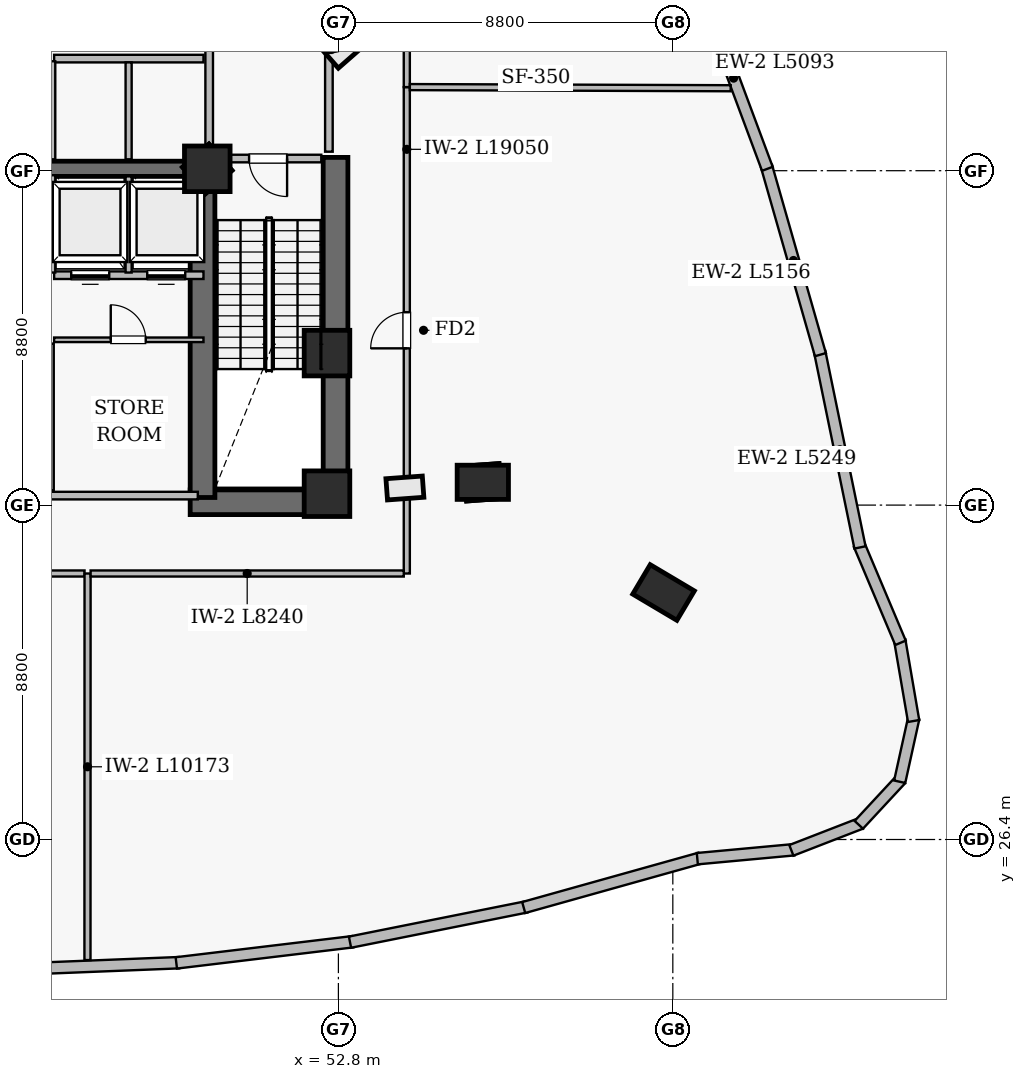
"""IFC4 building model, lengths in metres.
Left out: names, types, materials, properties, quantities, classifications, styles, units other than length and angle.
Written with IfcOpenShell. Run it as: python <this file> out.ifc"""

import sys

from ifc_helpers import new_model, si_unit, direction, frame, frame_2d, origin, origin_2d, place, context, subcontext, project, spatial, rectangle, extrude, element, fill, save


model = new_model("IFC4")
c1 = context("Model", 3, precision=1e-05, world=origin(), true_north=direction((0.0, 1.0)))
c2 = subcontext(c1, "Body", "Model", "MODEL_VIEW")
j1 = project(units=[si_unit("LENGTHUNIT", "METRE"), si_unit("PLANEANGLEUNIT", "RADIAN")], contexts=[c1])
p1 = place(None, origin())
s1 = spatial("IfcSite", under=j1, at=p1, CompositionType="ELEMENT")
p2 = place(p1, origin())
s2 = spatial("IfcBuilding", under=s1, at=p2, CompositionType="ELEMENT")
p3 = place(p2, frame((0.0, 0.0, 90.4)))
s3 = spatial("IfcBuildingStorey", under=s2, at=p3, CompositionType="ELEMENT", Elevation=90.4)
p4 = place(p3, frame((48.9, 35.275, 0.0), z_axis=(0.0, 0.0, 1.0), x_axis=(1.0, 0.0, 0.0)))
e1 = element("IfcWall", 1, at=p4, inside=s3, PredefinedType="SHEAR", context=c2, shape_type="SweptSolid", body=[
    extrude(rectangle(XDim=4.15, YDim=0.65, at=frame_2d((2.075, 0.0))), origin(), (0.0, 0.0, 1.0), 5.1),
])
p5 = place(p3, frame((52.725, 34.95, 0.0), z_axis=(0.0, 0.0, 1.0), x_axis=(0.0, 1.0, 0.0)))
e2 = element("IfcWall", 2, at=p5, inside=s3, PredefinedType="SHEAR", context=c2, shape_type="SweptSolid", body=[
    extrude(rectangle(XDim=9.4, YDim=0.65, at=frame_2d((4.7, 0.0))), origin(), (0.0, 0.0, 1.0), 5.1),
])
p6 = place(p3, frame((49.225, 35.4, 0.0), z_axis=(0.0, 0.0, 1.0), x_axis=(0.0, 1.0, 0.0)))
e3 = element("IfcWall", 3, at=p6, inside=s3, PredefinedType="SHEAR", context=c2, shape_type="SweptSolid", body=[
    extrude(rectangle(XDim=8.95, YDim=0.65, at=frame_2d((4.475, 0.0))), origin(), (0.0, 0.0, 1.0), 5.1),
])
p7 = place(p3, frame((45.05, 44.05, 0.0), z_axis=(0.0, 0.0, 1.0), x_axis=(1.0, 0.0, 0.0)))
e4 = element("IfcWall", 4, at=p7, inside=s3, PredefinedType="SHEAR", context=c2, shape_type="SweptSolid", body=[
    extrude(rectangle(XDim=4.2, YDim=0.4, at=frame_2d((2.1, 0.0))), origin(), (0.0, 0.0, 1.0), 5.1),
])
for number, where, z_axis, x_axis in (
    (5, (52.5, 35.5, 0.0), (0.0, 0.0, 1.0), (1.0, 0.0, 0.0)),
    (6, (52.5, 39.2, 0.0), (0.0, 0.0, 1.0), (1.0, 0.0, 0.0)),
    (7, (49.35, 44.05, 0.0), (0.0, 0.0, 1.0), (1.0, 0.0, 0.0)),
):
    element("IfcColumn", number, at=place(p3, frame(where, z_axis=z_axis, x_axis=x_axis)), inside=s3, PredefinedType="COLUMN", context=c2, shape_type="SweptSolid", body=[
        extrude(rectangle(XDim=1.2, YDim=1.2, at=origin_2d()), origin(), (0.0, 0.0, 1.0), 5.4),
    ])
for number, where, z_axis, x_axis in (
    (8, (56.6, 35.8, 0.0), (0.0, 0.0, 1.0), (1.0, 0.0, 0.0)),
    (9, (61.356, 32.9, 0.0), (0.0, 0.0, 1.0), (-0.86, 0.511, 0.0)),
):
    element("IfcColumn", number, at=place(p3, frame(where, z_axis=z_axis, x_axis=x_axis)), inside=s3, PredefinedType="COLUMN", context=c2, shape_type="SweptSolid", body=[
        extrude(rectangle(XDim=1.35, YDim=0.9, at=origin_2d()), origin(), (0.0, 0.0, 1.0), 5.4),
    ])
p8 = place(p3, frame((43.965, 22.973, 0.0), z_axis=(0.0, 0.0, 1.0), x_axis=(0.9992013786, 0.039957540002, 0.0)))
e10 = element("IfcWall", 10, at=p8, inside=s3, PredefinedType="SOLIDWALL", context=c2, shape_type="SweptSolid", body=[
    extrude(rectangle(XDim=4.644, YDim=0.3, at=frame_2d((2.322, 0.0))), origin(), (0.0, 0.0, 1.0), 5.1),
])
p9 = place(p3, frame((48.535, 23.153, 0.0), z_axis=(0.0, 0.0, 1.0), x_axis=(0.992872882239, 0.119178184728, 0.0)))
e11 = element("IfcWall", 11, at=p9, inside=s3, PredefinedType="SOLIDWALL", context=c2, shape_type="SweptSolid", body=[
    extrude(rectangle(XDim=4.673, YDim=0.3, at=frame_2d((2.336, 0.0))), origin(), (0.0, 0.0, 1.0), 5.1),
])
p10 = place(p3, frame((53.105, 23.698, 0.0), z_axis=(0.0, 0.0, 1.0), x_axis=(0.980568763514, 0.196175686621, 0.0)))
e12 = element("IfcWall", 12, at=p10, inside=s3, PredefinedType="SOLIDWALL", context=c2, shape_type="SweptSolid", body=[
    extrude(rectangle(XDim=4.73, YDim=0.3, at=frame_2d((2.365, 0.0))), origin(), (0.0, 0.0, 1.0), 5.1),
])
p11 = place(p3, frame((57.676, 24.61, 0.0), z_axis=(0.0, 0.0, 1.0), x_axis=(0.962968231939, 0.269614881407, 0.0)))
e13 = element("IfcWall", 13, at=p11, inside=s3, PredefinedType="SOLIDWALL", context=c2, shape_type="SweptSolid", body=[
    extrude(rectangle(XDim=4.815, YDim=0.3, at=frame_2d((2.408, 0.0))), origin(), (0.0, 0.0, 1.0), 5.1),
])
p12 = place(p3, frame((62.245, 25.896, 0.0), z_axis=(0.0, 0.0, 1.0), x_axis=(0.995758864763, 0.092001539368, 0.0)))
e14 = element("IfcWall", 14, at=p12, inside=s3, PredefinedType="SOLIDWALL", context=c2, shape_type="SweptSolid", body=[
    extrude(rectangle(XDim=2.553, YDim=0.3, at=frame_2d((1.276, 0.0))), origin(), (0.0, 0.0, 1.0), 5.1),
])
p13 = place(p3, frame((64.719, 26.115, 0.0), z_axis=(0.0, 0.0, 1.0), x_axis=(0.932284328801, 0.361726319575, 0.0)))
e15 = element("IfcWall", 15, at=p13, inside=s3, PredefinedType="SOLIDWALL", context=c2, shape_type="SweptSolid", body=[
    extrude(rectangle(XDim=1.964, YDim=0.3, at=frame_2d((0.982, 0.0))), origin(), (0.0, 0.0, 1.0), 5.1),
])
p14 = place(p3, frame((66.494, 26.787, 0.0), z_axis=(0.0, 0.0, 1.0), x_axis=(0.680140403354, 0.733081872457, 0.0)))
e16 = element("IfcWall", 16, at=p14, inside=s3, PredefinedType="SOLIDWALL", context=c2, shape_type="SweptSolid", body=[
    extrude(rectangle(XDim=1.628, YDim=0.3, at=frame_2d((0.814, 0.0))), origin(), (0.0, 0.0, 1.0), 5.1),
])
p15 = place(p3, frame((67.57, 27.92, 0.0), z_axis=(0.0, 0.0, 1.0), x_axis=(0.21565833033, 0.976468885607, 0.0)))
e17 = element("IfcWall", 17, at=p15, inside=s3, PredefinedType="SOLIDWALL", context=c2, shape_type="SweptSolid", body=[
    extrude(rectangle(XDim=1.707, YDim=0.3, at=frame_2d((0.854, 0.0))), origin(), (0.0, 0.0, 1.0), 5.1),
])
p16 = place(p3, frame((67.936, 29.518, 0.0), z_axis=(0.0, 0.0, 1.0), x_axis=(-0.169337924691, 0.985558048651, 0.0)))
e18 = element("IfcWall", 18, at=p16, inside=s3, PredefinedType="SOLIDWALL", context=c2, shape_type="SweptSolid", body=[
    extrude(rectangle(XDim=2.156, YDim=0.3, at=frame_2d((1.078, 0.0))), origin(), (0.0, 0.0, 1.0), 5.1),
])
p17 = place(p3, frame((67.591, 31.576, 0.0), z_axis=(0.0, 0.0, 1.0), x_axis=(-0.388591648194, 0.921410077519, 0.0)))
e19 = element("IfcWall", 19, at=p17, inside=s3, PredefinedType="SOLIDWALL", context=c2, shape_type="SweptSolid", body=[
    extrude(rectangle(XDim=2.796, YDim=0.3, at=frame_2d((1.398, 0.0))), origin(), (0.0, 0.0, 1.0), 5.1),
])
p18 = place(p3, frame((66.525, 34.086, 0.0), z_axis=(0.0, 0.0, 1.0), x_axis=(-0.201587300232, 0.979470551056, 0.0)))
e20 = element("IfcWall", 20, at=p18, inside=s3, PredefinedType="SOLIDWALL", context=c2, shape_type="SweptSolid", body=[
    extrude(rectangle(XDim=5.249, YDim=0.3, at=frame_2d((2.625, 0.0))), origin(), (0.0, 0.0, 1.0), 5.1),
])
p19 = place(p3, frame((65.483, 39.159, 0.0), z_axis=(0.0, 0.0, 1.0), x_axis=(-0.274933764691, 0.961463168839, 0.0)))
e21 = element("IfcWall", 21, at=p19, inside=s3, PredefinedType="SOLIDWALL", context=c2, shape_type="SweptSolid", body=[
    extrude(rectangle(XDim=5.156, YDim=0.3, at=frame_2d((2.578, 0.0))), origin(), (0.0, 0.0, 1.0), 5.1),
])
p20 = place(p3, frame((64.088, 44.049, 0.0), z_axis=(0.0, 0.0, 1.0), x_axis=(-0.349000064304, 0.937122700139, 0.0)))
e22 = element("IfcWall", 22, at=p20, inside=s3, PredefinedType="SOLIDWALL", context=c2, shape_type="SweptSolid", body=[
    extrude(rectangle(XDim=5.093, YDim=0.3, at=frame_2d((2.546, 0.0))), origin(), (0.0, 0.0, 1.0), 5.1),
])
p21 = place(p3, frame((54.6, 33.4, 0.0), z_axis=(0.0, 0.0, 1.0), x_axis=(0.0, 1.0, 0.0)))
e23 = element("IfcWall", 23, at=p21, inside=s3, PredefinedType="SOLIDWALL", context=c2, shape_type="SweptSolid", body=[
    extrude(rectangle(XDim=12.8, YDim=0.16, at=frame_2d((6.4, 0.0))), origin(), (0.0, 0.0, 1.0), 4.5),
])
p22 = place(p21, frame((5.925, 0.0, 0.0)))
e24 = element("IfcOpeningElement", 24, at=p22, cuts=e23, PredefinedType="OPENING", context=c2, shape_type="SweptSolid", body=[
    extrude(rectangle(XDim=0.95, YDim=2.15, at=frame_2d((0.475, 1.075))), frame((0.0, 0.09, 0.0), z_axis=(0.0, -1.0, 0.0), x_axis=(1.0, 0.0, 0.0)), (0.0, 0.0, 1.0), 0.18),
])
p23 = place(p3, frame((38.9, 35.45, 0.0), z_axis=(0.0, 0.0, 1.0), x_axis=(1.0, 0.0, 0.0)))
e25 = element("IfcWall", 25, at=p23, inside=s3, PredefinedType="SOLIDWALL", context=c2, shape_type="SweptSolid", body=[
    extrude(rectangle(XDim=10.2, YDim=0.2, at=frame_2d((5.1, 0.0))), origin(), (0.0, 0.0, 1.0), 5.1),
])
p24 = place(p23, frame((4.6, 0.0, 0.0)))
e26 = element("IfcOpeningElement", 26, at=p24, cuts=e25, PredefinedType="OPENING", context=c2, shape_type="SweptSolid", body=[
    extrude(rectangle(XDim=1.0, YDim=2.15, at=frame_2d((0.5, 1.075))), frame((0.0, 0.11, 0.0), z_axis=(0.0, -1.0, 0.0), x_axis=(1.0, 0.0, 0.0)), (0.0, 0.0, 1.0), 0.22),
])
p25 = place(p3, frame((52.55, 44.5, 0.0), z_axis=(0.0, 0.0, 1.0), x_axis=(0.0, 1.0, 0.0)))
e27 = element("IfcWall", 27, at=p25, inside=s3, PredefinedType="SOLIDWALL", context=c2, shape_type="SweptSolid", body=[
    extrude(rectangle(XDim=7.92, YDim=0.2, at=frame_2d((3.96, 0.0))), origin(), (0.0, 0.0, 1.0), 5.1),
])
p26 = place(p25, frame((2.6, 0.0, 0.0)))
e28 = element("IfcOpeningElement", 28, at=p26, cuts=e27, PredefinedType="OPENING", context=c2, shape_type="SweptSolid", body=[
    extrude(rectangle(XDim=1.0, YDim=2.15, at=frame_2d((0.5, 1.075))), frame((0.0, 0.11, 0.0), z_axis=(0.0, -1.0, 0.0), x_axis=(1.0, 0.0, 0.0)), (0.0, 0.0, 1.0), 0.22),
])
p27 = place(p3, frame((49.4, 44.5, 0.0), z_axis=(0.0, 0.0, 1.0), x_axis=(0.0, 1.0, 0.0)))
e29 = element("IfcWall", 29, at=p27, inside=s3, PredefinedType="SOLIDWALL", context=c2, shape_type="SweptSolid", body=[
    extrude(rectangle(XDim=7.92, YDim=0.2, at=frame_2d((3.96, 0.0))), origin(), (0.0, 0.0, 1.0), 4.188),
])
p28 = place(p27, frame((3.425, 0.0, 0.0)))
e30 = element("IfcOpeningElement", 30, at=p28, cuts=e29, PredefinedType="OPENING", context=c2, shape_type="SweptSolid", body=[
    extrude(rectangle(XDim=0.95, YDim=2.15, at=frame_2d((0.475, 1.075))), frame((0.0, 0.11, 0.0), z_axis=(0.0, -1.0, 0.0), x_axis=(1.0, 0.0, 0.0)), (0.0, 0.0, 1.0), 0.22),
])
p29 = place(p3, frame((54.6, 46.2, 0.0), z_axis=(0.0, 0.0, 1.0), x_axis=(0.0, 1.0, 0.0)))
e31 = element("IfcWall", 31, at=p29, inside=s3, PredefinedType="SOLIDWALL", context=c2, shape_type="SweptSolid", body=[
    extrude(rectangle(XDim=6.25, YDim=0.16, at=frame_2d((3.125, 0.0))), origin(), (0.0, 0.0, 1.0), 4.5),
])
p30 = place(p29, frame((2.65, 0.0, 0.0)))
e32 = element("IfcOpeningElement", 32, at=p30, cuts=e31, PredefinedType="OPENING", context=c2, shape_type="SweptSolid", body=[
    extrude(rectangle(XDim=0.95, YDim=2.15, at=frame_2d((0.475, 1.075))), frame((0.0, 0.09, 0.0), z_axis=(0.0, -1.0, 0.0), x_axis=(1.0, 0.0, 0.0)), (0.0, 0.0, 1.0), 0.18),
])
p31 = place(p3, frame((45.32, 41.25, 0.0), z_axis=(0.0, 0.0, 1.0), x_axis=(1.0, 0.0, 0.0)))
e33 = element("IfcWall", 33, at=p31, inside=s3, PredefinedType="SOLIDWALL", context=c2, shape_type="SweptSolid", body=[
    extrude(rectangle(XDim=3.93, YDim=0.2, at=frame_2d((1.965, 0.0))), origin(), (0.0, 0.0, 1.0), 5.1),
])
p32 = place(p31, frame((0.45, 0.0, 0.0)))
e34 = element("IfcOpeningElement", 34, at=p32, cuts=e33, PredefinedType="OPENING", context=c2, shape_type="SweptSolid", body=[
    extrude(rectangle(XDim=1.0, YDim=2.15, at=frame_2d((0.5, 1.075))), frame((0.0, 0.11, 0.0), z_axis=(0.0, -1.0, 0.0), x_axis=(1.0, 0.0, 0.0)), (0.0, 0.0, 1.0), 0.22),
])
p33 = place(p31, frame((2.45, 0.0, 0.0)))
e35 = element("IfcOpeningElement", 35, at=p33, cuts=e33, PredefinedType="OPENING", context=c2, shape_type="SweptSolid", body=[
    extrude(rectangle(XDim=1.0, YDim=2.15, at=frame_2d((0.5, 1.075))), frame((0.0, 0.11, 0.0), z_axis=(0.0, -1.0, 0.0), x_axis=(1.0, 0.0, 0.0)), (0.0, 0.0, 1.0), 0.22),
])
p34 = place(p3, frame((45.32, 39.55, 0.0), z_axis=(0.0, 0.0, 1.0), x_axis=(1.0, 0.0, 0.0)))
e36 = element("IfcWall", 36, at=p34, inside=s3, PredefinedType="PARTITIONING", context=c2, shape_type="SweptSolid", body=[
    extrude(rectangle(XDim=3.93, YDim=0.12, at=frame_2d((1.965, 0.0))), origin(), (0.0, 0.0, 1.0), 5.1),
])
p35 = place(p34, frame((1.49, 0.0, 0.0)))
e37 = element("IfcOpeningElement", 37, at=p35, cuts=e36, PredefinedType="OPENING", context=c2, shape_type="SweptSolid", body=[
    extrude(rectangle(XDim=0.92, YDim=2.1, at=frame_2d((0.46, 1.05))), frame((0.0, 0.07, 0.0), z_axis=(0.0, -1.0, 0.0), x_axis=(1.0, 0.0, 0.0)), (0.0, 0.0, 1.0), 0.14),
])
p36 = place(p3, frame((49.55, 44.32, 0.0), z_axis=(0.0, 0.0, 1.0), x_axis=(1.0, 0.0, 0.0)))
e38 = element("IfcWall", 38, at=p36, inside=s3, PredefinedType="SOLIDWALL", context=c2, shape_type="SweptSolid", body=[
    extrude(rectangle(XDim=2.8, YDim=0.2, at=frame_2d((1.4, 0.0))), origin(), (0.0, 0.0, 1.0), 4.188),
])
p37 = place(p36, frame((0.9, 0.0, 0.0)))
e39 = element("IfcOpeningElement", 39, at=p37, cuts=e38, PredefinedType="OPENING", context=c2, shape_type="SweptSolid", body=[
    extrude(rectangle(XDim=1.0, YDim=2.15, at=frame_2d((0.5, 1.075))), frame((0.0, 0.11, 0.0), z_axis=(0.0, -1.0, 0.0), x_axis=(1.0, 0.0, 0.0)), (0.0, 0.0, 1.0), 0.22),
])
p38 = place(p3, frame((33.48, 33.4, 0.0), z_axis=(0.0, 0.0, 1.0), x_axis=(1.0, 0.0, 0.0)))
e40 = element("IfcWall", 40, at=p38, inside=s3, PredefinedType="SOLIDWALL", context=c2, shape_type="SweptSolid", body=[
    extrude(rectangle(XDim=12.64, YDim=0.16, at=frame_2d((6.32, 0.0))), origin(), (0.0, 0.0, 1.0), 4.5),
])
p39 = place(p3, frame((46.197, 23.227, 0.0), z_axis=(0.0, 0.0, 1.0), x_axis=(0.000287990772, 0.999999958531, 0.0)))
e41 = element("IfcWall", 41, at=p39, inside=s3, PredefinedType="SOLIDWALL", context=c2, shape_type="SweptSolid", body=[
    extrude(rectangle(XDim=10.173, YDim=0.16, at=frame_2d((5.086, 0.0))), origin(), (0.0, 0.0, 1.0), 4.488),
])
p40 = place(p3, frame((63.122, 46.17, 0.0), z_axis=(0.0, 0.0, 1.0), x_axis=(-0.999993673679, 0.003557049708, 0.0)))
e42 = element("IfcWall", 42, at=p40, inside=s3, PredefinedType="SOLIDWALL", context=c2, shape_type="SweptSolid", body=[
    extrude(rectangle(XDim=8.442, YDim=0.16, at=frame_2d((4.221, 0.0))), origin(), (0.0, 0.0, 1.0), 4.488),
])
p41 = place(p3, frame((46.28, 33.4, 0.0), z_axis=(0.0, 0.0, 1.0), x_axis=(1.0, 0.0, 0.0)))
e43 = element("IfcWall", 43, at=p41, inside=s3, PredefinedType="SOLIDWALL", context=c2, shape_type="SweptSolid", body=[
    extrude(rectangle(XDim=8.24, YDim=0.16, at=frame_2d((4.12, 0.0))), origin(), (0.0, 0.0, 1.0), 4.5),
])
p42 = place(p3, frame((45.32, 46.95, 0.0), z_axis=(0.0, 0.0, 1.0), x_axis=(1.0, 0.0, 0.0)))
e44 = element("IfcWall", 44, at=p42, inside=s3, PredefinedType="SOLIDWALL", context=c2, shape_type="SweptSolid", body=[
    extrude(rectangle(XDim=3.93, YDim=0.2, at=frame_2d((1.965, 0.0))), origin(), (0.0, 0.0, 1.0), 4.188),
])
p43 = place(p3, frame((45.25, 35.58, 0.0), z_axis=(0.0, 0.0, 1.0), x_axis=(0.0, 1.0, 0.0)))
e45 = element("IfcWall", 45, at=p43, inside=s3, PredefinedType="PARTITIONING", context=c2, shape_type="SweptSolid", body=[
    extrude(rectangle(XDim=3.87, YDim=0.12, at=frame_2d((1.935, 0.0))), origin(), (0.0, 0.0, 1.0), 5.1),
])
p44 = place(p3, frame((45.25, 44.3, 0.0), z_axis=(0.0, 0.0, 1.0), x_axis=(0.0, 1.0, 0.0)))
e46 = element("IfcWall", 46, at=p44, inside=s3, PredefinedType="SOLIDWALL", context=c2, shape_type="SweptSolid", body=[
    extrude(rectangle(XDim=2.58, YDim=0.2, at=frame_2d((1.29, 0.0))), origin(), (0.0, 0.0, 1.0), 5.1),
])
p45 = place(p3, frame((45.25, 41.32, 0.0), z_axis=(0.0, 0.0, 1.0), x_axis=(0.0, 1.0, 0.0)))
e47 = element("IfcWall", 47, at=p45, inside=s3, PredefinedType="SOLIDWALL", context=c2, shape_type="SweptSolid", body=[
    extrude(rectangle(XDim=2.56, YDim=0.2, at=frame_2d((1.28, 0.0))), origin(), (0.0, 0.0, 1.0), 5.1),
])
p46 = place(p3, frame((47.28, 44.3, 0.0), z_axis=(0.0, 0.0, 1.0), x_axis=(0.0, 1.0, 0.0)))
e48 = element("IfcWall", 48, at=p46, inside=s3, PredefinedType="SOLIDWALL", context=c2, shape_type="SweptSolid", body=[
    extrude(rectangle(XDim=2.55, YDim=0.16, at=frame_2d((1.275, 0.0))), origin(), (0.0, 0.0, 1.0), 4.188),
])
p47 = place(p3, frame((47.28, 41.32, 0.0), z_axis=(0.0, 0.0, 1.0), x_axis=(0.0, 1.0, 0.0)))
e49 = element("IfcWall", 49, at=p47, inside=s3, PredefinedType="SOLIDWALL", context=c2, shape_type="SweptSolid", body=[
    extrude(rectangle(XDim=2.53, YDim=0.16, at=frame_2d((1.265, 0.0))), origin(), (0.0, 0.0, 1.0), 5.1),
])
p48 = place(p37, frame((1.0, 0.0, 0.0), z_axis=(0.0, 0.0, 1.0), x_axis=(-1.0, 0.0, 0.0)))
e50 = element("IfcDoor", 50, at=p48, inside=s3, OperationType="SINGLE_SWING_RIGHT", PredefinedType="DOOR", context=c2, shape_type="SweptSolid", body=[
    extrude(rectangle(XDim=1.0, YDim=2.15, at=frame_2d((0.5, 1.075))), frame((0.0, 0.025, 0.0), z_axis=(0.0, -1.0, 0.0), x_axis=(1.0, 0.0, 0.0)), (0.0, 0.0, 1.0), 0.05),
])
fill(e39, e50)
p49 = place(p26, frame((1.0, 0.0, 0.0), z_axis=(0.0, 0.0, 1.0), x_axis=(-1.0, 0.0, 0.0)))
e51 = element("IfcDoor", 51, at=p49, inside=s3, OperationType="SINGLE_SWING_RIGHT", PredefinedType="DOOR", context=c2, shape_type="SweptSolid", body=[
    extrude(rectangle(XDim=1.0, YDim=2.15, at=frame_2d((0.5, 1.075))), frame((0.0, 0.025, 0.0), z_axis=(0.0, -1.0, 0.0), x_axis=(1.0, 0.0, 0.0)), (0.0, 0.0, 1.0), 0.05),
])
fill(e28, e51)
p50 = place(p32, frame((1.0, 0.0, 0.0), z_axis=(0.0, 0.0, 1.0), x_axis=(-1.0, 0.0, 0.0)))
e52 = element("IfcDoor", 52, at=p50, inside=s3, OperationType="SLIDING_TO_LEFT", PredefinedType="DOOR", context=c2, shape_type="SweptSolid", body=[
    extrude(rectangle(XDim=1.0, YDim=2.15, at=frame_2d((0.5, 1.075))), frame((0.0, 0.025, 0.0), z_axis=(0.0, -1.0, 0.0), x_axis=(1.0, 0.0, 0.0)), (0.0, 0.0, 1.0), 0.05),
])
fill(e34, e52)
p51 = place(p33, frame((1.0, 0.0, 0.0), z_axis=(0.0, 0.0, 1.0), x_axis=(-1.0, 0.0, 0.0)))
e53 = element("IfcDoor", 53, at=p51, inside=s3, OperationType="SLIDING_TO_LEFT", PredefinedType="DOOR", context=c2, shape_type="SweptSolid", body=[
    extrude(rectangle(XDim=1.0, YDim=2.15, at=frame_2d((0.5, 1.075))), frame((0.0, 0.025, 0.0), z_axis=(0.0, -1.0, 0.0), x_axis=(1.0, 0.0, 0.0)), (0.0, 0.0, 1.0), 0.05),
])
fill(e35, e53)
p52 = place(p35, origin())
e54 = element("IfcDoor", 54, at=p52, inside=s3, OperationType="SINGLE_SWING_LEFT", PredefinedType="DOOR", context=c2, shape_type="SweptSolid", body=[
    extrude(rectangle(XDim=0.92, YDim=2.1, at=frame_2d((0.46, 1.05))), frame((0.0, 0.025, 0.0), z_axis=(0.0, -1.0, 0.0), x_axis=(1.0, 0.0, 0.0)), (0.0, 0.0, 1.0), 0.05),
])
fill(e37, e54)
p53 = place(p22, origin())
e55 = element("IfcDoor", 55, at=p53, inside=s3, OperationType="SINGLE_SWING_LEFT", PredefinedType="DOOR", context=c2, shape_type="SweptSolid", body=[
    extrude(rectangle(XDim=0.95, YDim=2.15, at=frame_2d((0.475, 1.075))), frame((0.0, 0.025, 0.0), z_axis=(0.0, -1.0, 0.0), x_axis=(1.0, 0.0, 0.0)), (0.0, 0.0, 1.0), 0.05),
])
fill(e24, e55)
save(model, sys.argv[1])
